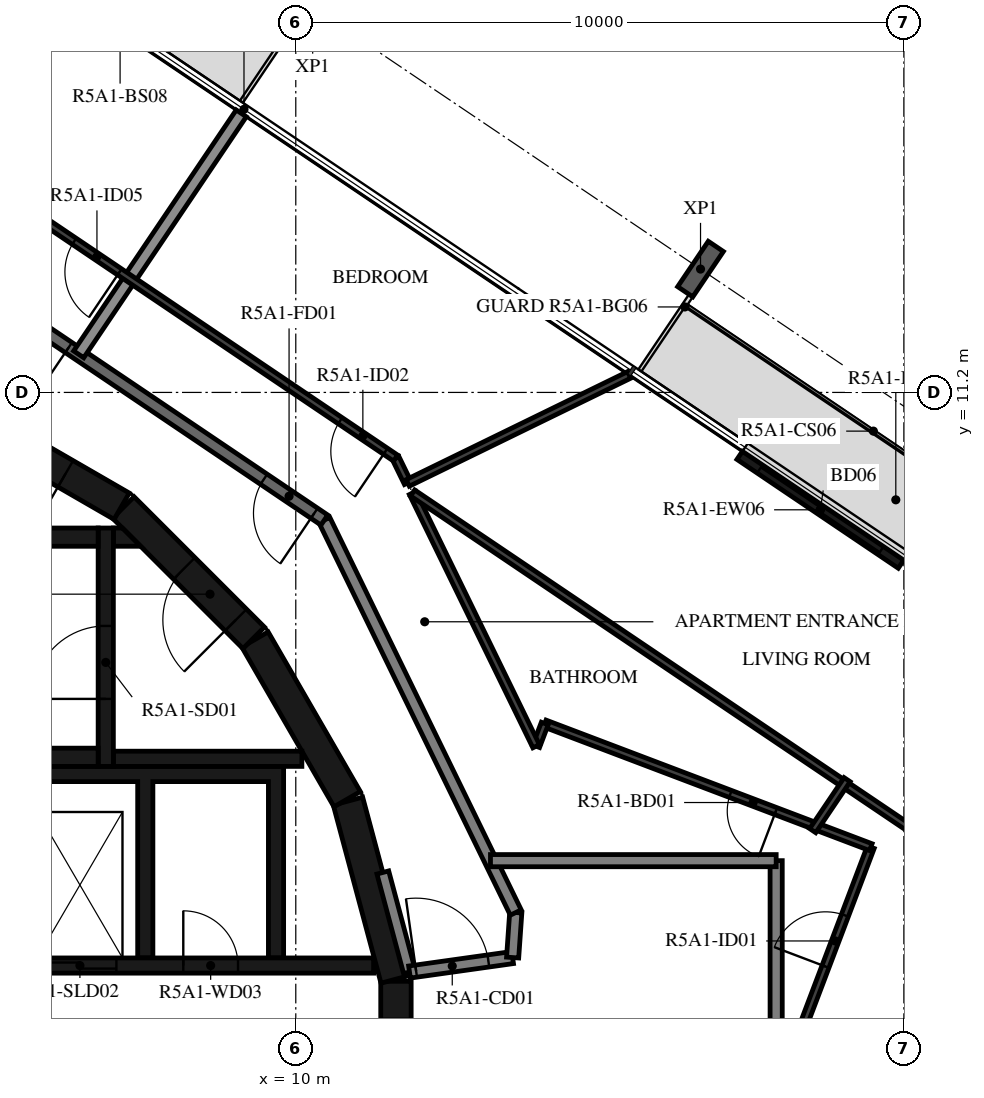
"""IFC4 building model, lengths in metres.
Left out: names, types, materials, properties, quantities, classifications, styles, units other than length and angle.
Written with IfcOpenShell. Run it as: python <this file> out.ifc"""

import sys

from ifc_helpers import new_model, si_unit, direction, frame, frame_2d, origin, origin_2d, place, context, subcontext, project, spatial, polyline, rectangle, i_section, outline, extrude, element, fill, save


model = new_model("IFC4")
c1 = context("Model", 3, precision=1e-05, world=origin(), true_north=direction((0.0, 1.0)))
c2 = subcontext(c1, "Body", "Model", "MODEL_VIEW")
j1 = project(units=[si_unit("LENGTHUNIT", "METRE"), si_unit("PLANEANGLEUNIT", "RADIAN")], contexts=[c1])
p1 = place(None, origin())
s1 = spatial("IfcSite", under=j1, at=p1, CompositionType="ELEMENT")
p2 = place(p1, origin())
s2 = spatial("IfcBuilding", under=s1, at=p2, CompositionType="ELEMENT")
p3 = place(p2, frame((0.0, 0.0, 191.9)))
s3 = spatial("IfcBuildingStorey", under=s2, at=p3, CompositionType="ELEMENT", Elevation=191.9)
p4 = place(p3, frame((16.656, 13.228, -0.38), z_axis=(0.0, 0.0, 1.0), x_axis=(0.829037661466, -0.559192771654, 0.0)))
e1 = element("IfcColumn", 1, at=p4, inside=s3, PredefinedType="COLUMN", context=c2, shape_type="SweptSolid", body=[
    extrude(i_section(OverallWidth=0.3, OverallDepth=0.9, WebThickness=0.019, FlangeThickness=0.035, FilletRadius=0.03, at=origin_2d()), origin(), (0.0, 0.0, 1.0), 3.5),
])
p5 = place(p3, frame((19.953, 8.375, 0.0), z_axis=(0.0, 0.0, 1.0), x_axis=(-0.829068838882, 0.55914654644, 0.0)))
e2 = element("IfcWall", 2, at=p5, inside=s3, PredefinedType="STANDARD", context=c2, shape_type="SweptSolid", body=[
    extrude(rectangle(XDim=3.2, YDim=0.16, at=frame_2d((1.6, 0.0))), origin(), (0.0, 0.0, 1.0), 3.12),
])
p6 = place(p5, frame((0.4, 0.0, 0.0)))
e3 = element("IfcOpeningElement", 3, at=p6, cuts=e2, PredefinedType="OPENING", context=c2, shape_type="SweptSolid", body=[
    extrude(rectangle(XDim=2.4, YDim=2.4, at=frame_2d((1.2, 1.2))), frame((0.0, 0.09, 0.0), z_axis=(0.0, -1.0, 0.0), x_axis=(1.0, 0.0, 0.0)), (0.0, 0.0, 1.0), 0.18),
])
p7 = place(p3, frame((11.647, -1.516, 0.0), z_axis=(0.0, 0.0, 1.0), x_axis=(0.0, 1.0, 0.0)))
e4 = element("IfcWall", 4, at=p7, inside=s3, PredefinedType="SHEAR", context=c2, shape_type="SweptSolid", body=[
    extrude(rectangle(XDim=3.033, YDim=0.5, at=frame_2d((1.516, 0.0))), origin(), (0.0, 0.0, 1.0), 3.12),
])
p8 = place(p7, frame((0.616, 0.0, 0.0)))
e5 = element("IfcOpeningElement", 5, at=p8, cuts=e4, PredefinedType="OPENING", context=c2, shape_type="SweptSolid", body=[
    extrude(rectangle(XDim=1.8, YDim=2.1, at=frame_2d((0.9, 1.05))), frame((0.0, 0.26, 0.0), z_axis=(0.0, -1.0, 0.0), x_axis=(1.0, 0.0, 0.0)), (0.0, 0.0, 1.0), 0.52),
])
for number, where, z_axis, x_axis in (
    (6, (11.643, 1.55, 0.0), (0.0, 0.0, 1.0), (-0.259, 0.966, 0.0)),
    (7, (10.845, 4.51, 0.0), (0.0, 0.0, 1.0), (-0.5, 0.866, 0.0)),
):
    element("IfcWall", number, at=place(p3, frame(where, z_axis=z_axis, x_axis=x_axis)), inside=s3, PredefinedType="SHEAR", context=c2, shape_type="SweptSolid", body=[
        extrude(rectangle(XDim=3.033, YDim=0.5, at=frame_2d((1.516, 0.0))), origin(), (0.0, 0.0, 1.0), 3.12),
    ])
p9 = place(p3, frame((9.308, 7.164, 0.0), z_axis=(0.0, 0.0, 1.0), x_axis=(-0.707106781187, 0.707106781187, 0.0)))
e8 = element("IfcWall", 8, at=p9, inside=s3, PredefinedType="SHEAR", context=c2, shape_type="SweptSolid", body=[
    extrude(rectangle(XDim=3.032, YDim=0.5, at=frame_2d((1.516, 0.0))), origin(), (0.0, 0.0, 1.0), 3.12),
])
p10 = place(p9, frame((0.416, 0.0, 0.0)))
e9 = element("IfcOpeningElement", 9, at=p10, cuts=e8, PredefinedType="OPENING", context=c2, shape_type="SweptSolid", body=[
    extrude(rectangle(XDim=1.2, YDim=2.1, at=frame_2d((0.6, 1.05))), frame((0.0, 0.26, 0.0), z_axis=(0.0, -1.0, 0.0), x_axis=(1.0, 0.0, 0.0)), (0.0, 0.0, 1.0), 0.52),
])
p11 = place(p3, frame((7.137, 9.329, 0.0), z_axis=(0.0, 0.0, 1.0), x_axis=(-0.865975092491, 0.500087131594, 0.0)))
e10 = element("IfcWall", 10, at=p11, inside=s3, PredefinedType="SHEAR", context=c2, shape_type="SweptSolid", body=[
    extrude(rectangle(XDim=3.033, YDim=0.5, at=frame_2d((1.516, 0.0))), origin(), (0.0, 0.0, 1.0), 3.12),
])
p12 = place(p11, frame((1.066, 0.0, 0.0)))
e11 = element("IfcOpeningElement", 11, at=p12, cuts=e10, PredefinedType="OPENING", context=c2, shape_type="SweptSolid", body=[
    extrude(rectangle(XDim=0.9, YDim=2.1, at=frame_2d((0.45, 1.05))), frame((0.0, 0.26, 0.0), z_axis=(0.0, -1.0, 0.0), x_axis=(1.0, 0.0, 0.0)), (0.0, 0.0, 1.0), 0.52),
])
for number, where, z_axis, x_axis in (
    (12, (0.0, 5.2, 0.0), (0.0, 0.0, 1.0), (1.0, 0.0, 0.0)),
    (13, (0.0, 8.82, 0.0), (0.0, 0.0, 1.0), (1.0, 0.0, 0.0)),
):
    element("IfcWall", number, at=place(p3, frame(where, z_axis=z_axis, x_axis=x_axis)), inside=s3, PredefinedType="SHEAR", context=c2, shape_type="SweptSolid", body=[
        extrude(rectangle(XDim=6.75, YDim=0.3, at=frame_2d((3.375, 0.0))), origin(), (0.0, 0.0, 1.0), 3.12),
    ])
p13 = place(p3, frame((6.875, 5.05, 0.0), z_axis=(0.0, 0.0, 1.0), x_axis=(0.0, 1.0, 0.0)))
e14 = element("IfcWall", 14, at=p13, inside=s3, PredefinedType="SHEAR", context=c2, shape_type="SweptSolid", body=[
    extrude(rectangle(XDim=3.92, YDim=0.25, at=frame_2d((1.96, 0.0))), origin(), (0.0, 0.0, 1.0), 3.12),
])
p14 = place(p13, frame((1.11, 0.0, 0.0)))
e15 = element("IfcOpeningElement", 15, at=p14, cuts=e14, PredefinedType="OPENING", context=c2, shape_type="SweptSolid", body=[
    extrude(rectangle(XDim=1.2, YDim=2.1, at=frame_2d((0.6, 1.05))), frame((0.0, 0.135, 0.0), z_axis=(0.0, -1.0, 0.0), x_axis=(1.0, 0.0, 0.0)), (0.0, 0.0, 1.0), 0.27),
])
p15 = place(p3, frame((7.0, 5.175, 0.0), z_axis=(0.0, 0.0, 1.0), x_axis=(1.0, 0.0, 0.0)))
e16 = element("IfcWall", 16, at=p15, inside=s3, PredefinedType="SHEAR", context=c2, shape_type="SweptSolid", body=[
    extrude(rectangle(XDim=3.1, YDim=0.25, at=frame_2d((1.55, 0.0))), origin(), (0.0, 0.0, 1.0), 3.12),
])
p16 = place(p3, origin())
e17 = element("IfcWall", 17, at=p16, inside=s3, PredefinedType="SHEAR", context=c2, shape_type="SweptSolid", body=[
    extrude(outline(polyline([(7.448, 8.67), (7.0, 8.67), (7.0, 8.97), (7.148, 8.97), (7.448, 8.67)])), origin(), (0.0, 0.0, 1.0), 3.12),
])
p17 = place(p3, origin())
e18 = element("IfcWall", 18, at=p17, inside=s3, PredefinedType="SHEAR", context=c2, shape_type="SweptSolid", body=[
    extrude(outline(polyline([(-9.55, 4.8), (-5.5, 4.8), (-5.5, 1.9), (-5.25, 1.9), (-5.25, 4.8), (-1.2, 4.8), (-1.2, 1.9), (-0.95, 1.9), (-0.95, 4.8), (0.95, 4.8), (0.95, 1.9), (1.2, 1.9), (1.2, 4.8), (3.1, 4.8), (3.1, 1.9), (3.35, 1.9), (3.35, 4.8), (5.25, 4.8), (5.25, 1.9), (5.5, 1.9), (5.5, 4.8), (7.4, 4.8), (7.4, 1.9), (7.65, 1.9), (7.65, 4.8), (9.55, 4.8), (9.55, 1.9), (9.8, 1.9), (9.8, 4.8), (9.8, 5.05), (-9.8, 5.05), (-9.8, 4.8), (-9.8, 1.9), (-9.55, 1.9), (-9.55, 4.8)])), origin(), (0.0, 0.0, 1.0), 3.12),
])
p18 = place(p3, frame((3.35, 1.775, 0.0), z_axis=(0.0, 0.0, 1.0), x_axis=(1.0, 0.0, 0.0)))
e19 = element("IfcWall", 19, at=p18, inside=s3, PredefinedType="SHEAR", context=c2, shape_type="SweptSolid", body=[
    extrude(rectangle(XDim=7.93, YDim=0.25, at=frame_2d((3.965, 0.0))), origin(), (0.0, 0.0, 1.0), 3.12),
])
p19 = place(p18, frame((0.35, 0.0, 0.0)))
e20 = element("IfcOpeningElement", 20, at=p19, cuts=e19, PredefinedType="OPENING", context=c2, shape_type="SweptSolid", body=[
    extrude(rectangle(XDim=1.2, YDim=2.4, at=frame_2d((0.6, 1.2))), frame((0.0, 0.135, 0.0), z_axis=(0.0, -1.0, 0.0), x_axis=(1.0, 0.0, 0.0)), (0.0, 0.0, 1.0), 0.27),
])
p20 = place(p18, frame((2.5, 0.0, 0.0)))
e21 = element("IfcOpeningElement", 21, at=p20, cuts=e19, PredefinedType="OPENING", context=c2, shape_type="SweptSolid", body=[
    extrude(rectangle(XDim=1.2, YDim=2.4, at=frame_2d((0.6, 1.2))), frame((0.0, 0.135, 0.0), z_axis=(0.0, -1.0, 0.0), x_axis=(1.0, 0.0, 0.0)), (0.0, 0.0, 1.0), 0.27),
])
p21 = place(p18, frame((4.8, 0.0, 0.0)))
e22 = element("IfcOpeningElement", 22, at=p21, cuts=e19, PredefinedType="OPENING", context=c2, shape_type="SweptSolid", body=[
    extrude(rectangle(XDim=0.9, YDim=2.1, at=frame_2d((0.45, 1.05))), frame((0.0, 0.135, 0.0), z_axis=(0.0, -1.0, 0.0), x_axis=(1.0, 0.0, 0.0)), (0.0, 0.0, 1.0), 0.27),
])
p22 = place(p3, frame((11.87, 1.668, 0.0), z_axis=(0.0, 0.0, 1.0), x_axis=(-0.258836880648, 0.965921047093, 0.0)))
e23 = element("IfcWall", 23, at=p22, inside=s3, PredefinedType="STANDARD", context=c2, shape_type="SweptSolid", body=[
    extrude(rectangle(XDim=1.695, YDim=0.2, at=frame_2d((0.848, 0.0))), origin(), (0.0, 0.0, 1.0), 3.12),
])
p23 = place(p3, frame((11.87, 1.668, 0.0), z_axis=(0.0, 0.0, 1.0), x_axis=(0.990271931984, 0.139145609792, 0.0)))
e24 = element("IfcWall", 24, at=p23, inside=s3, PredefinedType="STANDARD", context=c2, shape_type="SweptSolid", body=[
    extrude(rectangle(XDim=1.712, YDim=0.2, at=frame_2d((0.856, 0.0))), origin(), (0.0, 0.0, 1.0), 3.12),
])
p24 = place(p23, frame((0.11, 0.0, 0.0)))
e25 = element("IfcOpeningElement", 25, at=p24, cuts=e24, PredefinedType="OPENING", context=c2, shape_type="SweptSolid", body=[
    extrude(rectangle(XDim=1.2, YDim=2.1, at=frame_2d((0.6, 1.05))), frame((0.0, 0.11, 0.0), z_axis=(0.0, -1.0, 0.0), x_axis=(1.0, 0.0, 0.0)), (0.0, 0.0, 1.0), 0.22),
])
p25 = place(p3, frame((13.566, 1.906, 0.0), z_axis=(0.0, 0.0, 1.0), x_axis=(0.07005495793, 0.997543133338, 0.0)))
e26 = element("IfcWall", 26, at=p25, inside=s3, PredefinedType="STANDARD", context=c2, shape_type="SweptSolid", body=[
    extrude(rectangle(XDim=0.742, YDim=0.2, at=frame_2d((0.371, 0.0))), origin(), (0.0, 0.0, 1.0), 3.12),
])
p26 = place(p3, frame((13.618, 2.647, 0.0), z_axis=(0.0, 0.0, 1.0), x_axis=(-0.438366026218, 0.898796543751, 0.0)))
e27 = element("IfcWall", 27, at=p26, inside=s3, PredefinedType="STANDARD", context=c2, shape_type="SweptSolid", body=[
    extrude(rectangle(XDim=7.181, YDim=0.2, at=frame_2d((3.591, 0.0))), origin(), (0.0, 0.0, 1.0), 3.12),
])
p27 = place(p3, frame((10.47, 9.101, 0.0), z_axis=(0.0, 0.0, 1.0), x_axis=(-0.829035841718, 0.559195469534, 0.0)))
e28 = element("IfcWall", 28, at=p27, inside=s3, PredefinedType="STANDARD", context=c2, shape_type="SweptSolid", body=[
    extrude(rectangle(XDim=7.181, YDim=0.2, at=frame_2d((3.591, 0.0))), origin(), (0.0, 0.0, 1.0), 3.12),
])
p28 = place(p27, frame((0.2, 0.0, 0.0)))
e29 = element("IfcOpeningElement", 29, at=p28, cuts=e28, PredefinedType="OPENING", context=c2, shape_type="SweptSolid", body=[
    extrude(rectangle(XDim=1.0, YDim=2.1, at=frame_2d((0.5, 1.05))), frame((0.0, 0.11, 0.0), z_axis=(0.0, -1.0, 0.0), x_axis=(1.0, 0.0, 0.0)), (0.0, 0.0, 1.0), 0.22),
])
p29 = place(p27, frame((5.073, 0.0, 0.0)))
e30 = element("IfcOpeningElement", 30, at=p29, cuts=e28, PredefinedType="OPENING", context=c2, shape_type="SweptSolid", body=[
    extrude(rectangle(XDim=1.0, YDim=2.1, at=frame_2d((0.5, 1.05))), frame((0.0, 0.11, 0.0), z_axis=(0.0, -1.0, 0.0), x_axis=(1.0, 0.0, 0.0)), (0.0, 0.0, 1.0), 0.22),
])
p30 = place(p3, frame((17.9, -3.5, 0.0), z_axis=(0.0, 0.0, 1.0), x_axis=(0.0, 1.0, 0.0)))
e31 = element("IfcWall", 31, at=p30, inside=s3, PredefinedType="STANDARD", context=c2, shape_type="SweptSolid", body=[
    extrude(rectangle(XDim=7.0, YDim=0.2, at=frame_2d((3.5, 0.0))), origin(), (0.0, 0.0, 1.0), 3.12),
])
p31 = place(p3, frame((17.9, 3.5, 0.0), z_axis=(0.0, 0.0, 1.0), x_axis=(-1.0, 0.0, 0.0)))
e32 = element("IfcWall", 32, at=p31, inside=s3, PredefinedType="STANDARD", context=c2, shape_type="SweptSolid", body=[
    extrude(rectangle(XDim=4.698, YDim=0.2, at=frame_2d((2.349, 0.0))), origin(), (0.0, 0.0, 1.0), 3.12),
])
p32 = place(p3, frame((9.104, 15.79, 0.0), z_axis=(0.0, 0.0, 1.0), x_axis=(-0.559193912135, -0.829036892201, 0.0)))
e33 = element("IfcWall", 33, at=p32, inside=s3, PredefinedType="STANDARD", context=c2, shape_type="SweptSolid", body=[
    extrude(rectangle(XDim=4.781, YDim=0.2, at=frame_2d((2.39, 0.0))), origin(), (0.0, 0.0, 1.0), 2.73),
])
p33 = place(p3, frame((18.286, 0.637, 0.0), z_axis=(0.0, 0.0, 1.0), x_axis=(0.354672075988, 0.934990758518, 0.0)))
e34 = element("IfcWall", 34, at=p33, inside=s3, PredefinedType="PARTITIONING", context=c2, shape_type="SweptSolid", body=[
    extrude(rectangle(XDim=3.3, YDim=0.12, at=frame_2d((1.65, 0.0))), origin(), (0.0, 0.0, 1.0), 3.12),
])
p34 = place(p33, frame((1.2, 0.0, 0.0)))
e35 = element("IfcOpeningElement", 35, at=p34, cuts=e34, PredefinedType="OPENING", context=c2, shape_type="SweptSolid", body=[
    extrude(rectangle(XDim=0.9, YDim=2.1, at=frame_2d((0.45, 1.05))), frame((0.0, 0.07, 0.0), z_axis=(0.0, -1.0, 0.0), x_axis=(1.0, 0.0, 0.0)), (0.0, 0.0, 1.0), 0.14),
])
p35 = place(p3, frame((19.456, 3.722, 0.0), z_axis=(0.0, 0.0, 1.0), x_axis=(-0.935017484321, 0.3546016131, 0.0)))
e36 = element("IfcWall", 36, at=p35, inside=s3, PredefinedType="PARTITIONING", context=c2, shape_type="SweptSolid", body=[
    extrude(rectangle(XDim=5.734, YDim=0.12, at=frame_2d((2.867, 0.0))), origin(), (0.0, 0.0, 1.0), 3.12),
])
p36 = place(p35, frame((1.669, 0.0, 0.0)))
e37 = element("IfcOpeningElement", 37, at=p36, cuts=e36, PredefinedType="OPENING", context=c2, shape_type="SweptSolid", body=[
    extrude(rectangle(XDim=0.8, YDim=2.1, at=frame_2d((0.4, 1.05))), frame((0.0, 0.07, 0.0), z_axis=(0.0, -1.0, 0.0), x_axis=(1.0, 0.0, 0.0)), (0.0, 0.0, 1.0), 0.14),
])
p37 = place(p3, frame((14.094, 5.756, 0.0), z_axis=(0.0, 0.0, 1.0), x_axis=(-0.354267529254, -0.935144116014, 0.0)))
e38 = element("IfcWall", 38, at=p37, inside=s3, PredefinedType="PARTITIONING", context=c2, shape_type="SweptSolid", body=[
    extrude(rectangle(XDim=0.4, YDim=0.12, at=frame_2d((0.2, 0.0))), origin(), (0.0, 0.0, 1.0), 3.12),
])
p38 = place(p3, frame((13.953, 5.382, 0.0), z_axis=(0.0, 0.0, 1.0), x_axis=(-0.438382107355, 0.898788700391, 0.0)))
e39 = element("IfcWall", 39, at=p38, inside=s3, PredefinedType="PARTITIONING", context=c2, shape_type="SweptSolid", body=[
    extrude(rectangle(XDim=4.634, YDim=0.12, at=frame_2d((2.317, 0.0))), origin(), (0.0, 0.0, 1.0), 3.12),
])
p39 = place(p3, frame((11.841, 9.712, 0.0), z_axis=(0.0, 0.0, 1.0), x_axis=(-0.438381293215, 0.898789097486, 0.0)))
e40 = element("IfcWall", 40, at=p39, inside=s3, PredefinedType="PARTITIONING", context=c2, shape_type="SweptSolid", body=[
    extrude(rectangle(XDim=0.454, YDim=0.12, at=frame_2d((0.227, 0.0))), origin(), (0.0, 0.0, 1.0), 3.12),
])
p40 = place(p3, frame((11.642, 10.12, 0.0), z_axis=(0.0, 0.0, 1.0), x_axis=(-0.829032241779, 0.55920080659, 0.0)))
e41 = element("IfcWall", 41, at=p40, inside=s3, PredefinedType="PARTITIONING", context=c2, shape_type="SweptSolid", body=[
    extrude(rectangle(XDim=7.985, YDim=0.12, at=frame_2d((3.992, 0.0))), origin(), (0.0, 0.0, 1.0), 3.12),
])
p41 = place(p40, frame((0.2, 0.0, 0.0)))
e42 = element("IfcOpeningElement", 42, at=p41, cuts=e41, PredefinedType="OPENING", context=c2, shape_type="SweptSolid", body=[
    extrude(rectangle(XDim=0.9, YDim=2.1, at=frame_2d((0.45, 1.05))), frame((0.0, 0.07, 0.0), z_axis=(0.0, -1.0, 0.0), x_axis=(1.0, 0.0, 0.0)), (0.0, 0.0, 1.0), 0.14),
])
p42 = place(p40, frame((5.475, 0.0, 0.0)))
e43 = element("IfcOpeningElement", 43, at=p42, cuts=e41, PredefinedType="OPENING", context=c2, shape_type="SweptSolid", body=[
    extrude(rectangle(XDim=0.9, YDim=2.1, at=frame_2d((0.45, 1.05))), frame((0.0, 0.07, 0.0), z_axis=(0.0, -1.0, 0.0), x_axis=(1.0, 0.0, 0.0)), (0.0, 0.0, 1.0), 0.14),
])
p43 = place(p3, frame((22.598, 2.345, 0.0), z_axis=(0.0, 0.0, 1.0), x_axis=(-0.829034113947, 0.559198031034, 0.0)))
e44 = element("IfcWall", 44, at=p43, inside=s3, PredefinedType="PARTITIONING", context=c2, shape_type="SweptSolid", body=[
    extrude(rectangle(XDim=12.879, YDim=0.12, at=frame_2d((6.439, 0.0))), origin(), (0.0, 0.0, 1.0), 3.12),
])
p44 = place(p43, frame((0.2, 0.0, 0.0)))
e45 = element("IfcOpeningElement", 45, at=p44, cuts=e44, PredefinedType="OPENING", context=c2, shape_type="SweptSolid", body=[
    extrude(rectangle(XDim=0.9, YDim=2.1, at=frame_2d((0.45, 1.05))), frame((0.0, 0.07, 0.0), z_axis=(0.0, -1.0, 0.0), x_axis=(1.0, 0.0, 0.0)), (0.0, 0.0, 1.0), 0.14),
])
p45 = place(p3, frame((19.067, 4.832, 0.0), z_axis=(0.0, 0.0, 1.0), x_axis=(-0.559257363459, -0.828994090098, 0.0)))
e46 = element("IfcWall", 46, at=p45, inside=s3, PredefinedType="PARTITIONING", context=c2, shape_type="SweptSolid", body=[
    extrude(rectangle(XDim=1.012, YDim=0.12, at=frame_2d((0.506, 0.0))), origin(), (0.0, 0.0, 1.0), 3.12),
])
p46 = place(p3, frame((15.482, 11.487, 0.0), z_axis=(0.0, 0.0, 1.0), x_axis=(-0.898807251285, -0.438344071521, 0.0)))
e47 = element("IfcWall", 47, at=p46, inside=s3, PredefinedType="PARTITIONING", context=c2, shape_type="SweptSolid", body=[
    extrude(rectangle(XDim=4.051, YDim=0.12, at=frame_2d((2.025, 0.0))), origin(), (0.0, 0.0, 1.0), 3.12),
])
p47 = place(p6, origin())
e48 = element("IfcDoor", 48, at=p47, inside=s3, OperationType="DOUBLE_DOOR_SLIDING", PredefinedType="DOOR", context=c2, shape_type="SweptSolid", body=[
    extrude(rectangle(XDim=2.4, YDim=2.4, at=frame_2d((1.2, 1.2))), frame((0.0, 0.025, 0.0), z_axis=(0.0, -1.0, 0.0), x_axis=(1.0, 0.0, 0.0)), (0.0, 0.0, 1.0), 0.05),
])
fill(e3, e48)
p48 = place(p14, origin())
e49 = element("IfcDoor", 49, at=p48, inside=s3, OperationType="SINGLE_SWING_LEFT", PredefinedType="DOOR", context=c2, shape_type="SweptSolid", body=[
    extrude(rectangle(XDim=1.2, YDim=2.1, at=frame_2d((0.6, 1.05))), frame((0.0, 0.025, 0.0), z_axis=(0.0, -1.0, 0.0), x_axis=(1.0, 0.0, 0.0)), (0.0, 0.0, 1.0), 0.05),
])
fill(e15, e49)
p49 = place(p10, origin())
e50 = element("IfcDoor", 50, at=p49, inside=s3, OperationType="SINGLE_SWING_RIGHT", PredefinedType="DOOR", context=c2, shape_type="SweptSolid", body=[
    extrude(rectangle(XDim=1.2, YDim=2.1, at=frame_2d((0.6, 1.05))), frame((0.0, 0.025, 0.0), z_axis=(0.0, -1.0, 0.0), x_axis=(1.0, 0.0, 0.0)), (0.0, 0.0, 1.0), 0.05),
])
fill(e9, e50)
p50 = place(p20, origin())
e51 = element("IfcDoor", 51, at=p50, inside=s3, OperationType="DOUBLE_DOOR_SLIDING", PredefinedType="DOOR", context=c2, shape_type="SweptSolid", body=[
    extrude(rectangle(XDim=1.2, YDim=2.4, at=frame_2d((0.6, 1.2))), frame((0.0, 0.025, 0.0), z_axis=(0.0, -1.0, 0.0), x_axis=(1.0, 0.0, 0.0)), (0.0, 0.0, 1.0), 0.05),
])
fill(e21, e51)
p51 = place(p21, origin())
e52 = element("IfcDoor", 52, at=p51, inside=s3, OperationType="SINGLE_SWING_LEFT", PredefinedType="DOOR", context=c2, shape_type="SweptSolid", body=[
    extrude(rectangle(XDim=0.9, YDim=2.1, at=frame_2d((0.45, 1.05))), frame((0.0, 0.025, 0.0), z_axis=(0.0, -1.0, 0.0), x_axis=(1.0, 0.0, 0.0)), (0.0, 0.0, 1.0), 0.05),
])
fill(e22, e52)
p52 = place(p12, origin())
e53 = element("IfcDoor", 53, at=p52, inside=s3, OperationType="SINGLE_SWING_RIGHT", PredefinedType="DOOR", context=c2, shape_type="SweptSolid", body=[
    extrude(rectangle(XDim=0.9, YDim=2.1, at=frame_2d((0.45, 1.05))), frame((0.0, 0.025, 0.0), z_axis=(0.0, -1.0, 0.0), x_axis=(1.0, 0.0, 0.0)), (0.0, 0.0, 1.0), 0.05),
])
fill(e11, e53)
p53 = place(p28, origin())
e54 = element("IfcDoor", 54, at=p53, inside=s3, OperationType="SINGLE_SWING_LEFT", PredefinedType="DOOR", context=c2, shape_type="SweptSolid", body=[
    extrude(rectangle(XDim=1.0, YDim=2.1, at=frame_2d((0.5, 1.05))), frame((0.0, 0.025, 0.0), z_axis=(0.0, -1.0, 0.0), x_axis=(1.0, 0.0, 0.0)), (0.0, 0.0, 1.0), 0.05),
])
fill(e29, e54)
p54 = place(p34, origin())
e55 = element("IfcDoor", 55, at=p54, inside=s3, OperationType="SINGLE_SWING_LEFT", PredefinedType="DOOR", context=c2, shape_type="SweptSolid", body=[
    extrude(rectangle(XDim=0.9, YDim=2.1, at=frame_2d((0.45, 1.05))), frame((0.0, 0.025, 0.0), z_axis=(0.0, -1.0, 0.0), x_axis=(1.0, 0.0, 0.0)), (0.0, 0.0, 1.0), 0.05),
])
fill(e35, e55)
p55 = place(p36, origin())
e56 = element("IfcDoor", 56, at=p55, inside=s3, OperationType="SINGLE_SWING_LEFT", PredefinedType="DOOR", context=c2, shape_type="SweptSolid", body=[
    extrude(rectangle(XDim=0.8, YDim=2.1, at=frame_2d((0.4, 1.05))), frame((0.0, 0.025, 0.0), z_axis=(0.0, -1.0, 0.0), x_axis=(1.0, 0.0, 0.0)), (0.0, 0.0, 1.0), 0.05),
])
fill(e37, e56)
p56 = place(p41, origin())
e57 = element("IfcDoor", 57, at=p56, inside=s3, OperationType="SINGLE_SWING_LEFT", PredefinedType="DOOR", context=c2, shape_type="SweptSolid", body=[
    extrude(rectangle(XDim=0.9, YDim=2.1, at=frame_2d((0.45, 1.05))), frame((0.0, 0.025, 0.0), z_axis=(0.0, -1.0, 0.0), x_axis=(1.0, 0.0, 0.0)), (0.0, 0.0, 1.0), 0.05),
])
fill(e42, e57)
p57 = place(p29, origin())
e58 = element("IfcDoor", 58, at=p57, inside=s3, OperationType="SINGLE_SWING_RIGHT", PredefinedType="DOOR", context=c2, shape_type="SweptSolid", body=[
    extrude(rectangle(XDim=1.0, YDim=2.1, at=frame_2d((0.5, 1.05))), frame((0.0, 0.025, 0.0), z_axis=(0.0, -1.0, 0.0), x_axis=(1.0, 0.0, 0.0)), (0.0, 0.0, 1.0), 0.05),
])
fill(e30, e58)
p58 = place(p42, origin())
e59 = element("IfcDoor", 59, at=p58, inside=s3, OperationType="SINGLE_SWING_RIGHT", PredefinedType="DOOR", context=c2, shape_type="SweptSolid", body=[
    extrude(rectangle(XDim=0.9, YDim=2.1, at=frame_2d((0.45, 1.05))), frame((0.0, 0.025, 0.0), z_axis=(0.0, -1.0, 0.0), x_axis=(1.0, 0.0, 0.0)), (0.0, 0.0, 1.0), 0.05),
])
fill(e43, e59)
p59 = place(p24, origin())
e60 = element("IfcDoor", 60, at=p59, inside=s3, OperationType="DOUBLE_DOOR_SINGLE_SWING", PredefinedType="DOOR", context=c2, shape_type="SweptSolid", body=[
    extrude(rectangle(XDim=1.2, YDim=2.1, at=frame_2d((0.6, 1.05))), frame((0.0, 0.025, 0.0), z_axis=(0.0, -1.0, 0.0), x_axis=(1.0, 0.0, 0.0)), (0.0, 0.0, 1.0), 0.05),
])
fill(e25, e60)
save(model, sys.argv[1])
